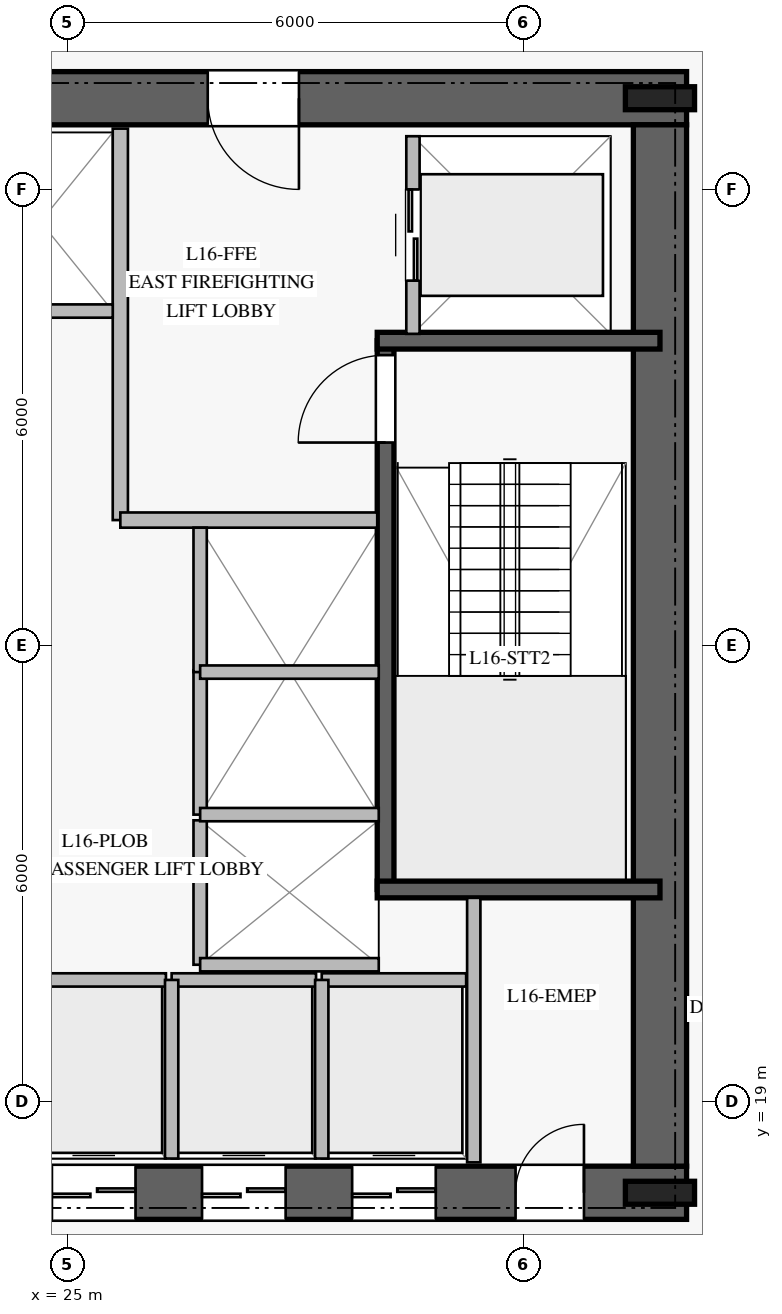
"""IFC4 building model, lengths in metres.
Left out: names, types, materials, properties, quantities, classifications, styles, units other than length and angle.
Written with IfcOpenShell. Run it as: python <this file> out.ifc"""

import sys

from ifc_helpers import new_model, si_unit, direction, frame, frame_2d, origin, origin_2d, place, context, subcontext, project, spatial, rectangle, i_section, extrude, element, fill, save


model = new_model("IFC4")
c1 = context("Model", 3, precision=1e-05, world=origin(), true_north=direction((0.0, 1.0)))
c2 = subcontext(c1, "Body", "Model", "MODEL_VIEW")
j1 = project(units=[si_unit("LENGTHUNIT", "METRE"), si_unit("PLANEANGLEUNIT", "RADIAN")], contexts=[c1])
p1 = place(None, origin())
s1 = spatial("IfcSite", under=j1, at=p1, CompositionType="ELEMENT")
p2 = place(p1, origin())
s2 = spatial("IfcBuilding", under=s1, at=p2, CompositionType="ELEMENT")
p3 = place(p2, frame((0.0, 0.0, 68.0)))
s3 = spatial("IfcBuildingStorey", under=s2, at=p3, CompositionType="ELEMENT", Elevation=68.0)
p4 = place(p3, frame((16.85, 17.8, 0.0), z_axis=(0.0, 0.0, 1.0), x_axis=(1.0, 0.0, 0.0)))
e1 = element("IfcWall", 1, at=p4, inside=s3, PredefinedType="SHEAR", context=c2, shape_type="SweptSolid", body=[
    extrude(rectangle(XDim=16.3, YDim=0.7, at=frame_2d((8.15, 0.0))), origin(), (0.0, 0.0, 1.0), 3.76),
])
p5 = place(p4, frame((5.1, 0.0, 0.0)))
e2 = element("IfcOpeningElement", 2, at=p5, cuts=e1, PredefinedType="OPENING", context=c2, shape_type="SweptSolid", body=[
    extrude(rectangle(XDim=1.2, YDim=2.25, at=frame_2d((0.6, 1.125))), frame((0.0, 0.36, 0.0), z_axis=(0.0, -1.0, 0.0), x_axis=(1.0, 0.0, 0.0)), (0.0, 0.0, 1.0), 0.72),
])
p6 = place(p4, frame((14.05, 0.0, 0.0)))
e3 = element("IfcOpeningElement", 3, at=p6, cuts=e1, PredefinedType="OPENING", context=c2, shape_type="SweptSolid", body=[
    extrude(rectangle(XDim=0.9, YDim=2.1, at=frame_2d((0.45, 1.05))), frame((0.0, 0.36, 0.0), z_axis=(0.0, -1.0, 0.0), x_axis=(1.0, 0.0, 0.0)), (0.0, 0.0, 1.0), 0.72),
])
p7 = place(p4, frame((7.95, 0.0, 0.0)))
e4 = element("IfcOpeningElement", 4, at=p7, cuts=e1, PredefinedType="OPENING", context=c2, shape_type="SweptSolid", body=[
    extrude(rectangle(XDim=1.1, YDim=2.2, at=frame_2d((0.55, 1.1))), frame((0.0, 0.36, 0.0), z_axis=(0.0, -1.0, 0.0), x_axis=(1.0, 0.0, 0.0)), (0.0, 0.0, 1.0), 0.72),
])
p8 = place(p4, frame((9.925, 0.0, 0.0)))
e5 = element("IfcOpeningElement", 5, at=p8, cuts=e1, PredefinedType="OPENING", context=c2, shape_type="SweptSolid", body=[
    extrude(rectangle(XDim=1.1, YDim=2.2, at=frame_2d((0.55, 1.1))), frame((0.0, 0.36, 0.0), z_axis=(0.0, -1.0, 0.0), x_axis=(1.0, 0.0, 0.0)), (0.0, 0.0, 1.0), 0.72),
])
p9 = place(p4, frame((11.9, 0.0, 0.0)))
e6 = element("IfcOpeningElement", 6, at=p9, cuts=e1, PredefinedType="OPENING", context=c2, shape_type="SweptSolid", body=[
    extrude(rectangle(XDim=1.1, YDim=2.2, at=frame_2d((0.55, 1.1))), frame((0.0, 0.36, 0.0), z_axis=(0.0, -1.0, 0.0), x_axis=(1.0, 0.0, 0.0)), (0.0, 0.0, 1.0), 0.72),
])
p10 = place(p3, frame((33.15, 32.2, 0.0), z_axis=(0.0, 0.0, 1.0), x_axis=(-1.0, 0.0, 0.0)))
e7 = element("IfcWall", 7, at=p10, inside=s3, PredefinedType="SHEAR", context=c2, shape_type="SweptSolid", body=[
    extrude(rectangle(XDim=16.3, YDim=0.7, at=frame_2d((8.15, 0.0))), origin(), (0.0, 0.0, 1.0), 3.76),
])
p11 = place(p10, frame((5.1, 0.0, 0.0)))
e8 = element("IfcOpeningElement", 8, at=p11, cuts=e7, PredefinedType="OPENING", context=c2, shape_type="SweptSolid", body=[
    extrude(rectangle(XDim=1.2, YDim=2.25, at=frame_2d((0.6, 1.125))), frame((0.0, 0.36, 0.0), z_axis=(0.0, -1.0, 0.0), x_axis=(1.0, 0.0, 0.0)), (0.0, 0.0, 1.0), 0.72),
])
p12 = place(p3, frame((32.8, 18.15, 0.0), z_axis=(0.0, 0.0, 1.0), x_axis=(0.0, 1.0, 0.0)))
e9 = element("IfcWall", 9, at=p12, inside=s3, PredefinedType="SHEAR", context=c2, shape_type="SweptSolid", body=[
    extrude(rectangle(XDim=13.7, YDim=0.7, at=frame_2d((6.85, 0.0))), origin(), (0.0, 0.0, 1.0), 3.76),
])
for number, where, z_axis, x_axis in (
    (10, (32.8, 17.8, 0.0), (0.0, 0.0, 1.0), (1.0, 0.0, 0.0)),
    (11, (32.8, 32.2, 0.0), (0.0, 0.0, 1.0), (1.0, 0.0, 0.0)),
):
    element("IfcColumn", number, at=place(p3, frame(where, z_axis=z_axis, x_axis=x_axis)), inside=s3, PredefinedType="COLUMN", context=c2, shape_type="SweptSolid", body=[
        extrude(i_section(OverallWidth=0.302, OverallDepth=0.91, WebThickness=0.021, FlangeThickness=0.04, at=origin_2d()), origin(), (0.0, 0.0, 1.0), 4.0),
    ])
p13 = place(p3, frame((29.19, 21.79, 0.0), z_axis=(0.0, 0.0, 1.0), x_axis=(0.0, 1.0, 0.0)))
e12 = element("IfcWall", 12, at=p13, inside=s3, PredefinedType="SOLIDWALL", context=c2, shape_type="SweptSolid", body=[
    extrude(rectangle(XDim=7.22, YDim=0.22, at=frame_2d((3.61, 0.0))), origin(), (0.0, 0.0, 1.0), 3.76),
])
p14 = place(p13, frame((5.88, 0.0, 0.0)))
e13 = element("IfcOpeningElement", 13, at=p14, cuts=e12, PredefinedType="OPENING", context=c2, shape_type="SweptSolid", body=[
    extrude(rectangle(XDim=1.15, YDim=2.2, at=frame_2d((0.575, 1.1))), frame((0.0, 0.12, 0.0), z_axis=(0.0, -1.0, 0.0), x_axis=(1.0, 0.0, 0.0)), (0.0, 0.0, 1.0), 0.24),
])
for number, where, z_axis, x_axis in (
    (14, (29.08, 21.79, 0.0), (0.0, 0.0, 1.0), (1.0, 0.0, 0.0)),
    (15, (29.08, 29.01, 0.0), (0.0, 0.0, 1.0), (1.0, 0.0, 0.0)),
):
    element("IfcWall", number, at=place(p3, frame(where, z_axis=z_axis, x_axis=x_axis)), inside=s3, PredefinedType="SOLIDWALL", context=c2, shape_type="SweptSolid", body=[
        extrude(rectangle(XDim=3.72, YDim=0.22, at=frame_2d((1.86, 0.0))), origin(), (0.0, 0.0, 1.0), 3.76),
    ])
p15 = place(p3, frame((25.7, 26.65, 0.0), z_axis=(0.0, 0.0, 1.0), x_axis=(0.0, 1.0, 0.0)))
e16 = element("IfcWall", 16, at=p15, inside=s3, PredefinedType="PARTITIONING", context=c2, shape_type="SweptSolid", body=[
    extrude(rectangle(XDim=5.15, YDim=0.2, at=frame_2d((2.575, 0.0))), origin(), (0.0, 0.0, 1.0), 3.76),
])
p16 = place(p3, frame((25.7, 26.65, 0.0), z_axis=(0.0, 0.0, 1.0), x_axis=(1.0, 0.0, 0.0)))
e17 = element("IfcWall", 17, at=p16, inside=s3, PredefinedType="PARTITIONING", context=c2, shape_type="SweptSolid", body=[
    extrude(rectangle(XDim=3.38, YDim=0.2, at=frame_2d((1.69, 0.0))), origin(), (0.0, 0.0, 1.0), 3.76),
])
p17 = place(p3, frame((30.35, 18.2, 0.0), z_axis=(0.0, 0.0, 1.0), x_axis=(0.0, 1.0, 0.0)))
e18 = element("IfcWall", 18, at=p17, inside=s3, PredefinedType="PARTITIONING", context=c2, shape_type="SweptSolid", body=[
    extrude(rectangle(XDim=3.48, YDim=0.175, at=frame_2d((1.74, 0.0))), origin(), (0.0, 0.0, 1.0), 3.76),
])
p18 = place(p3, frame((24.4, 20.6, 0.0), z_axis=(0.0, 0.0, 1.0), x_axis=(1.0, 0.0, 0.0)))
e19 = element("IfcWall", 19, at=p18, inside=s3, PredefinedType="PARTITIONING", context=c2, shape_type="SweptSolid", body=[
    extrude(rectangle(XDim=1.9, YDim=0.175, at=frame_2d((0.95, 0.0))), origin(), (0.0, 0.0, 1.0), 3.76),
])
p19 = place(p3, frame((26.375, 20.6, 0.0), z_axis=(0.0, 0.0, 1.0), x_axis=(1.0, 0.0, 0.0)))
e20 = element("IfcWall", 20, at=p19, inside=s3, PredefinedType="PARTITIONING", context=c2, shape_type="SweptSolid", body=[
    extrude(rectangle(XDim=1.9, YDim=0.175, at=frame_2d((0.95, 0.0))), origin(), (0.0, 0.0, 1.0), 3.76),
])
p20 = place(p3, frame((26.375, 18.25, 0.0), z_axis=(0.0, 0.0, 1.0), x_axis=(0.0, 1.0, 0.0)))
e21 = element("IfcWall", 21, at=p20, inside=s3, PredefinedType="PARTITIONING", context=c2, shape_type="SweptSolid", body=[
    extrude(rectangle(XDim=2.35, YDim=0.175, at=frame_2d((1.175, 0.0))), origin(), (0.0, 0.0, 1.0), 3.76),
])
p21 = place(p3, frame((28.35, 20.6, 0.0), z_axis=(0.0, 0.0, 1.0), x_axis=(1.0, 0.0, 0.0)))
e22 = element("IfcWall", 22, at=p21, inside=s3, PredefinedType="PARTITIONING", context=c2, shape_type="SweptSolid", body=[
    extrude(rectangle(XDim=1.9, YDim=0.175, at=frame_2d((0.95, 0.0))), origin(), (0.0, 0.0, 1.0), 3.76),
])
p22 = place(p3, frame((28.35, 18.25, 0.0), z_axis=(0.0, 0.0, 1.0), x_axis=(0.0, 1.0, 0.0)))
e23 = element("IfcWall", 23, at=p22, inside=s3, PredefinedType="PARTITIONING", context=c2, shape_type="SweptSolid", body=[
    extrude(rectangle(XDim=2.35, YDim=0.175, at=frame_2d((1.175, 0.0))), origin(), (0.0, 0.0, 1.0), 3.76),
])
p23 = place(p3, frame((23.7, 29.4, 0.0), z_axis=(0.0, 0.0, 1.0), x_axis=(1.0, 0.0, 0.0)))
e24 = element("IfcWall", 24, at=p23, inside=s3, PredefinedType="PARTITIONING", context=c2, shape_type="SweptSolid", body=[
    extrude(rectangle(XDim=1.9, YDim=0.175, at=frame_2d((0.95, 0.0))), origin(), (0.0, 0.0, 1.0), 3.76),
])
p24 = place(p3, frame((26.75, 20.8, 0.0), z_axis=(0.0, 0.0, 1.0), x_axis=(0.0, 1.0, 0.0)))
e25 = element("IfcWall", 25, at=p24, inside=s3, PredefinedType="PARTITIONING", context=c2, shape_type="SweptSolid", body=[
    extrude(rectangle(XDim=1.9, YDim=0.175, at=frame_2d((0.95, 0.0))), origin(), (0.0, 0.0, 1.0), 3.76),
])
p25 = place(p3, frame((26.75, 20.8, 0.0), z_axis=(0.0, 0.0, 1.0), x_axis=(1.0, 0.0, 0.0)))
e26 = element("IfcWall", 26, at=p25, inside=s3, PredefinedType="PARTITIONING", context=c2, shape_type="SweptSolid", body=[
    extrude(rectangle(XDim=2.35, YDim=0.175, at=frame_2d((1.175, 0.0))), origin(), (0.0, 0.0, 1.0), 3.76),
])
p26 = place(p3, frame((26.75, 22.775, 0.0), z_axis=(0.0, 0.0, 1.0), x_axis=(0.0, 1.0, 0.0)))
e27 = element("IfcWall", 27, at=p26, inside=s3, PredefinedType="PARTITIONING", context=c2, shape_type="SweptSolid", body=[
    extrude(rectangle(XDim=1.9, YDim=0.175, at=frame_2d((0.95, 0.0))), origin(), (0.0, 0.0, 1.0), 3.76),
])
p27 = place(p3, frame((26.75, 22.775, 0.0), z_axis=(0.0, 0.0, 1.0), x_axis=(1.0, 0.0, 0.0)))
e28 = element("IfcWall", 28, at=p27, inside=s3, PredefinedType="PARTITIONING", context=c2, shape_type="SweptSolid", body=[
    extrude(rectangle(XDim=2.35, YDim=0.175, at=frame_2d((1.175, 0.0))), origin(), (0.0, 0.0, 1.0), 3.76),
])
p28 = place(p3, frame((26.75, 24.65, 0.0), z_axis=(0.0, 0.0, 1.0), x_axis=(0.0, 1.0, 0.0)))
e29 = element("IfcWall", 29, at=p28, inside=s3, PredefinedType="PARTITIONING", context=c2, shape_type="SweptSolid", body=[
    extrude(rectangle(XDim=1.9, YDim=0.175, at=frame_2d((0.95, 0.0))), origin(), (0.0, 0.0, 1.0), 3.76),
])
p29 = place(p3, frame((26.75, 24.65, 0.0), z_axis=(0.0, 0.0, 1.0), x_axis=(1.0, 0.0, 0.0)))
e30 = element("IfcWall", 30, at=p29, inside=s3, PredefinedType="PARTITIONING", context=c2, shape_type="SweptSolid", body=[
    extrude(rectangle(XDim=2.35, YDim=0.175, at=frame_2d((1.175, 0.0))), origin(), (0.0, 0.0, 1.0), 3.76),
])
p30 = place(p3, frame((29.55, 29.1, 0.0), z_axis=(0.0, 0.0, 1.0), x_axis=(0.0, 1.0, 0.0)))
e31 = element("IfcWall", 31, at=p30, inside=s3, PredefinedType="PARTITIONING", context=c2, shape_type="SweptSolid", body=[
    extrude(rectangle(XDim=2.6, YDim=0.175, at=frame_2d((1.3, 0.0))), origin(), (0.0, 0.0, 1.0), 3.76),
])
p31 = place(p30, frame((0.7, 0.0, 0.0)))
e32 = element("IfcOpeningElement", 32, at=p31, cuts=e31, PredefinedType="OPENING", context=c2, shape_type="SweptSolid", body=[
    extrude(rectangle(XDim=1.2, YDim=2.2, at=frame_2d((0.6, 1.1))), frame((0.0, 0.098, 0.0), z_axis=(0.0, -1.0, 0.0), x_axis=(1.0, 0.0, 0.0)), (0.0, 0.0, 1.0), 0.195),
])
p32 = place(p3, frame((33.281, 13.87, 0.0), z_axis=(0.0, 0.0, 1.0), x_axis=(0.668723423756, 0.74351125245, 0.0)))
e33 = element("IfcWall", 33, at=p32, inside=s3, PredefinedType="PARTITIONING", context=c2, shape_type="SweptSolid", body=[
    extrude(rectangle(XDim=12.914, YDim=0.125, at=frame_2d((6.457, 0.0))), origin(), (0.0, 0.0, 1.0), 3.21),
])
p33 = place(p32, frame((5.868, 0.0, 0.0)))
e34 = element("IfcOpeningElement", 34, at=p33, cuts=e33, PredefinedType="OPENING", context=c2, shape_type="SweptSolid", body=[
    extrude(rectangle(XDim=1.0, YDim=2.15, at=frame_2d((0.5, 1.075))), frame((0.0, 0.073, 0.0), z_axis=(0.0, -1.0, 0.0), x_axis=(1.0, 0.0, 0.0)), (0.0, 0.0, 1.0), 0.145),
])
p34 = place(p14, origin())
e35 = element("IfcDoor", 35, at=p34, inside=s3, OperationType="SINGLE_SWING_LEFT", PredefinedType="DOOR", context=c2, shape_type="SweptSolid", body=[
    extrude(rectangle(XDim=1.15, YDim=2.2, at=frame_2d((0.575, 1.1))), frame((0.0, 0.025, 0.0), z_axis=(0.0, -1.0, 0.0), x_axis=(1.0, 0.0, 0.0)), (0.0, 0.0, 1.0), 0.05),
])
fill(e13, e35)
p35 = place(p11, origin())
e36 = element("IfcDoor", 36, at=p35, inside=s3, OperationType="SINGLE_SWING_LEFT", PredefinedType="DOOR", context=c2, shape_type="SweptSolid", body=[
    extrude(rectangle(XDim=1.2, YDim=2.25, at=frame_2d((0.6, 1.125))), frame((0.0, 0.025, 0.0), z_axis=(0.0, -1.0, 0.0), x_axis=(1.0, 0.0, 0.0)), (0.0, 0.0, 1.0), 0.05),
])
fill(e8, e36)
p36 = place(p6, origin())
e37 = element("IfcDoor", 37, at=p36, inside=s3, OperationType="SINGLE_SWING_RIGHT", PredefinedType="DOOR", context=c2, shape_type="SweptSolid", body=[
    extrude(rectangle(XDim=0.9, YDim=2.1, at=frame_2d((0.45, 1.05))), frame((0.0, 0.025, 0.0), z_axis=(0.0, -1.0, 0.0), x_axis=(1.0, 0.0, 0.0)), (0.0, 0.0, 1.0), 0.05),
])
fill(e3, e37)
p37 = place(p7, origin())
e38 = element("IfcDoor", 38, at=p37, inside=s3, OperationType="DOUBLE_DOOR_SLIDING", PredefinedType="DOOR", context=c2, shape_type="SweptSolid", body=[
    extrude(rectangle(XDim=1.1, YDim=2.2, at=frame_2d((0.55, 1.1))), frame((0.0, 0.025, 0.0), z_axis=(0.0, -1.0, 0.0), x_axis=(1.0, 0.0, 0.0)), (0.0, 0.0, 1.0), 0.05),
])
fill(e4, e38)
p38 = place(p8, origin())
e39 = element("IfcDoor", 39, at=p38, inside=s3, OperationType="DOUBLE_DOOR_SLIDING", PredefinedType="DOOR", context=c2, shape_type="SweptSolid", body=[
    extrude(rectangle(XDim=1.1, YDim=2.2, at=frame_2d((0.55, 1.1))), frame((0.0, 0.025, 0.0), z_axis=(0.0, -1.0, 0.0), x_axis=(1.0, 0.0, 0.0)), (0.0, 0.0, 1.0), 0.05),
])
fill(e5, e39)
p39 = place(p9, origin())
e40 = element("IfcDoor", 40, at=p39, inside=s3, OperationType="DOUBLE_DOOR_SLIDING", PredefinedType="DOOR", context=c2, shape_type="SweptSolid", body=[
    extrude(rectangle(XDim=1.1, YDim=2.2, at=frame_2d((0.55, 1.1))), frame((0.0, 0.025, 0.0), z_axis=(0.0, -1.0, 0.0), x_axis=(1.0, 0.0, 0.0)), (0.0, 0.0, 1.0), 0.05),
])
fill(e6, e40)
p40 = place(p31, origin())
e41 = element("IfcDoor", 41, at=p40, inside=s3, OperationType="DOUBLE_DOOR_SLIDING", PredefinedType="DOOR", context=c2, shape_type="SweptSolid", body=[
    extrude(rectangle(XDim=1.2, YDim=2.2, at=frame_2d((0.6, 1.1))), frame((0.0, 0.025, 0.0), z_axis=(0.0, -1.0, 0.0), x_axis=(1.0, 0.0, 0.0)), (0.0, 0.0, 1.0), 0.05),
])
fill(e32, e41)
save(model, sys.argv[1])
